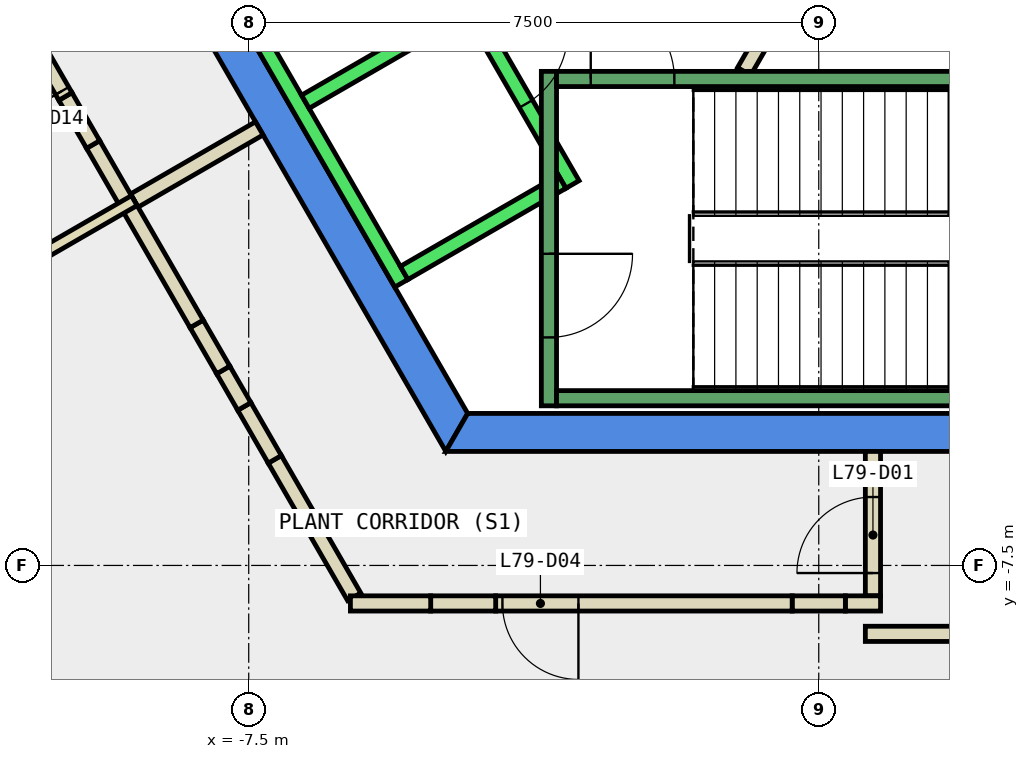
"""IFC4 building model, lengths in metres.
Left out: names, types, materials, properties, quantities, classifications, styles, units other than length and angle.
Written with IfcOpenShell. Run it as: python <this file> out.ifc"""

import sys

from ifc_helpers import new_model, si_unit, direction, frame, frame_2d, origin, place, context, subcontext, project, spatial, polyline, rectangle, outline, extrude, element, fill, save


model = new_model("IFC4")
c1 = context("Model", 3, precision=1e-05, world=origin(), true_north=direction((0.0, 1.0)))
c2 = subcontext(c1, "Body", "Model", "MODEL_VIEW")
j1 = project(units=[si_unit("LENGTHUNIT", "METRE"), si_unit("PLANEANGLEUNIT", "RADIAN")], contexts=[c1])
p1 = place(None, origin())
s1 = spatial("IfcSite", under=j1, at=p1, CompositionType="ELEMENT")
p2 = place(p1, origin())
s2 = spatial("IfcBuilding", under=s1, at=p2, CompositionType="ELEMENT")
p3 = place(p2, frame((0.0, 0.0, 335.9)))
s3 = spatial("IfcBuildingStorey", under=s2, at=p3, CompositionType="ELEMENT", Elevation=335.9)
p4 = place(p3, frame((0.0, 0.0, -0.35)))
e1 = element("IfcWall", 1, at=p4, inside=s3, PredefinedType="SHEAR", context=c2, shape_type="SweptSolid", body=[
    extrude(outline(polyline([(-9.815, 2.5), (-4.907, -6.0), (-4.619, -5.5), (-9.238, 2.5), (-9.815, 2.5)])), origin(), (0.0, 0.0, 1.0), 4.4),
])
p5 = place(p3, frame((0.0, 0.0, -0.35)))
e2 = element("IfcWall", 2, at=p5, inside=s3, PredefinedType="SHEAR", context=c2, shape_type="SweptSolid", body=[
    extrude(outline(polyline([(3.75, -6.0), (3.75, -5.5), (-4.619, -5.5), (-4.907, -6.0), (3.75, -6.0)])), origin(), (0.0, 0.0, 1.0), 4.4),
])
p6 = place(p3, frame((-0.982, -1.0, 0.0), z_axis=(0.0, 0.0, 1.0), x_axis=(0.50024047865, 0.865886518847, 0.0)))
e3 = element("IfcWall", 3, at=p6, inside=s3, PredefinedType="PARTITIONING", context=c2, shape_type="SweptSolid", body=[
    extrude(rectangle(XDim=1.863, YDim=0.2, at=frame_2d((0.931, 0.0))), origin(), (0.0, 0.0, 1.0), 4.05),
])
p7 = place(p3, frame((0.713, -7.9, 0.0), z_axis=(0.0, 0.0, 1.0), x_axis=(0.0, 1.0, 0.0)))
e4 = element("IfcWall", 4, at=p7, inside=s3, PredefinedType="PARTITIONING", context=c2, shape_type="SweptSolid", body=[
    extrude(rectangle(XDim=1.9, YDim=0.2, at=frame_2d((0.95, 0.0))), origin(), (0.0, 0.0, 1.0), 4.05),
])
p8 = place(p7, frame((0.3, 0.0, 0.0)))
e5 = element("IfcOpeningElement", 5, at=p8, cuts=e4, PredefinedType="OPENING", context=c2, shape_type="SweptSolid", body=[
    extrude(rectangle(XDim=1.0, YDim=2.1, at=frame_2d((0.5, 1.05))), frame((0.0, 0.11, 0.0), z_axis=(0.0, -1.0, 0.0), x_axis=(1.0, 0.0, 0.0)), (0.0, 0.0, 1.0), 0.22),
])
p9 = place(p3, frame((2.042, -8.4, 0.0), z_axis=(0.0, 0.0, 1.0), x_axis=(-1.0, 0.0, 0.0)))
e6 = element("IfcWall", 6, at=p9, inside=s3, PredefinedType="PARTITIONING", context=c2, shape_type="SweptSolid", body=[
    extrude(rectangle(XDim=1.429, YDim=0.2, at=frame_2d((0.714, 0.0))), origin(), (0.0, 0.0, 1.0), 4.05),
])
p10 = place(p3, frame((0.813, -8.0, 0.0), z_axis=(0.0, 0.0, 1.0), x_axis=(-1.0, 0.0, 0.0)))
e7 = element("IfcWall", 7, at=p10, inside=s3, PredefinedType="PARTITIONING", context=c2, shape_type="SweptSolid", body=[
    extrude(rectangle(XDim=0.463, YDim=0.2, at=frame_2d((0.231, 0.0))), origin(), (0.0, 0.0, 1.0), 4.05),
])
p11 = place(p3, frame((-6.112, -7.913, 0.0), z_axis=(0.0, 0.0, 1.0), x_axis=(-0.500160776593, 0.865932559475, 0.0)))
e8 = element("IfcWall", 8, at=p11, inside=s3, PredefinedType="PARTITIONING", context=c2, shape_type="SweptSolid", body=[
    extrude(rectangle(XDim=2.089, YDim=0.2, at=frame_2d((1.044, 0.0))), origin(), (0.0, 0.0, 1.0), 4.05),
])
p12 = place(p3, frame((-9.006, -2.7, 0.0), z_axis=(0.0, 0.0, 1.0), x_axis=(0.865980106173, 0.500078449558, 0.0)))
e9 = element("IfcWall", 9, at=p12, inside=s3, PredefinedType="PARTITIONING", context=c2, shape_type="SweptSolid", body=[
    extrude(rectangle(XDim=1.9, YDim=0.2, at=frame_2d((0.95, 0.0))), origin(), (0.0, 0.0, 1.0), 4.05),
])
p13 = place(p3, frame((-9.105, -2.728, 0.0), z_axis=(0.0, 0.0, 1.0), x_axis=(-0.499849883363, 0.866112056319, 0.0)))
e10 = element("IfcWall", 10, at=p13, inside=s3, PredefinedType="PARTITIONING", context=c2, shape_type="SweptSolid", body=[
    extrude(rectangle(XDim=0.885, YDim=0.2, at=frame_2d((0.442, 0.0))), origin(), (0.0, 0.0, 1.0), 4.05),
])
p14 = place(p3, frame((0.35, -8.0, 0.0), z_axis=(0.0, 0.0, 1.0), x_axis=(-1.0, 0.0, 0.0)))
e11 = element("IfcWall", 11, at=p14, inside=s3, PredefinedType="PARTITIONING", context=c2, shape_type="SweptSolid", body=[
    extrude(rectangle(XDim=0.7, YDim=0.2, at=frame_2d((0.35, 0.0))), origin(), (0.0, 0.0, 1.0), 1.95),
])
p15 = place(p3, frame((-0.35, -8.0, 0.0), z_axis=(0.0, 0.0, 1.0), x_axis=(-1.0, 0.0, 0.0)))
e12 = element("IfcWall", 12, at=p15, inside=s3, PredefinedType="PARTITIONING", context=c2, shape_type="SweptSolid", body=[
    extrude(rectangle(XDim=3.901, YDim=0.2, at=frame_2d((1.95, 0.0))), origin(), (0.0, 0.0, 1.0), 4.05),
])
p16 = place(p15, frame((2.812, 0.0, 0.0)))
e13 = element("IfcOpeningElement", 13, at=p16, cuts=e12, PredefinedType="OPENING", context=c2, shape_type="SweptSolid", body=[
    extrude(rectangle(XDim=1.0, YDim=2.1, at=frame_2d((0.5, 1.05))), frame((0.0, 0.11, 0.0), z_axis=(0.0, -1.0, 0.0), x_axis=(1.0, 0.0, 0.0)), (0.0, 0.0, 1.0), 0.22),
])
p17 = place(p3, frame((-4.251, -8.0, 0.0), z_axis=(0.0, 0.0, 1.0), x_axis=(-1.0, 0.0, 0.0)))
e14 = element("IfcWall", 14, at=p17, inside=s3, PredefinedType="PARTITIONING", context=c2, shape_type="SweptSolid", body=[
    extrude(rectangle(XDim=0.855, YDim=0.2, at=frame_2d((0.427, 0.0))), origin(), (0.0, 0.0, 1.0), 1.95),
])
p18 = place(p3, frame((-5.106, -8.0, 0.0), z_axis=(0.0, 0.0, 1.0), x_axis=(-1.0, 0.0, 0.0)))
e15 = element("IfcWall", 15, at=p18, inside=s3, PredefinedType="PARTITIONING", context=c2, shape_type="SweptSolid", body=[
    extrude(rectangle(XDim=1.056, YDim=0.2, at=frame_2d((0.528, 0.0))), origin(), (0.0, 0.0, 1.0), 4.05),
])
p19 = place(p3, frame((-7.157, -6.104, 0.0), z_axis=(0.0, 0.0, 1.0), x_axis=(-0.49931022413, 0.866423279973, 0.0)))
e16 = element("IfcWall", 16, at=p19, inside=s3, PredefinedType="PARTITIONING", context=c2, shape_type="SweptSolid", body=[
    extrude(rectangle(XDim=0.803, YDim=0.2, at=frame_2d((0.402, 0.0))), origin(), (0.0, 0.0, 1.0), 1.95),
])
p20 = place(p3, frame((-7.558, -5.408, 0.0), z_axis=(0.0, 0.0, 1.0), x_axis=(-0.499646164767, 0.866229594296, 0.0)))
e17 = element("IfcWall", 17, at=p20, inside=s3, PredefinedType="PARTITIONING", context=c2, shape_type="SweptSolid", body=[
    extrude(rectangle(XDim=0.554, YDim=0.2, at=frame_2d((0.277, 0.0))), origin(), (0.0, 0.0, 1.0), 4.05),
])
p21 = place(p3, frame((-7.835, -4.928, 0.0), z_axis=(0.0, 0.0, 1.0), x_axis=(-0.500265973451, 0.865871789474, 0.0)))
e18 = element("IfcWall", 18, at=p21, inside=s3, PredefinedType="PARTITIONING", context=c2, shape_type="SweptSolid", body=[
    extrude(rectangle(XDim=0.7, YDim=0.2, at=frame_2d((0.35, 0.0))), origin(), (0.0, 0.0, 1.0), 1.95),
])
p22 = place(p3, frame((-8.185, -4.322, 0.0), z_axis=(0.0, 0.0, 1.0), x_axis=(-0.499848773445, 0.866112696874, 0.0)))
e19 = element("IfcWall", 19, at=p22, inside=s3, PredefinedType="PARTITIONING", context=c2, shape_type="SweptSolid", body=[
    extrude(rectangle(XDim=1.84, YDim=0.2, at=frame_2d((0.92, 0.0))), origin(), (0.0, 0.0, 1.0), 4.05),
])
p23 = place(p3, frame((-20.401, -9.28, 0.0), z_axis=(0.0, 0.0, 1.0), x_axis=(0.865982571061, 0.500074181116, 0.0)))
e20 = element("IfcWall", 20, at=p23, inside=s3, PredefinedType="PARTITIONING", context=c2, shape_type="SweptSolid", body=[
    extrude(rectangle(XDim=13.158, YDim=0.15, at=frame_2d((6.579, 0.0))), origin(), (0.0, 0.0, 1.0), 4.05),
])
p24 = place(p3, frame((-9.547, -1.962, 0.0), z_axis=(0.0, 0.0, 1.0), x_axis=(-0.500205129465, 0.865906939836, 0.0)))
e21 = element("IfcWall", 21, at=p24, inside=s3, PredefinedType="PARTITIONING", context=c2, shape_type="SweptSolid", body=[
    extrude(rectangle(XDim=0.73, YDim=0.2, at=frame_2d((0.365, 0.0))), origin(), (0.0, 0.0, 1.0), 1.95),
])
p25 = place(p3, frame((-9.912, -1.33, 0.0), z_axis=(0.0, 0.0, 1.0), x_axis=(-0.500512107711, 0.865729536307, 0.0)))
e22 = element("IfcWall", 22, at=p25, inside=s3, PredefinedType="PARTITIONING", context=c2, shape_type="SweptSolid", body=[
    extrude(rectangle(XDim=1.249, YDim=0.2, at=frame_2d((0.625, 0.0))), origin(), (0.0, 0.0, 1.0), 4.05),
])
p26 = place(p25, frame((0.085, 0.0, 0.0)))
e23 = element("IfcOpeningElement", 23, at=p26, cuts=e22, PredefinedType="OPENING", context=c2, shape_type="SweptSolid", body=[
    extrude(rectangle(XDim=1.0, YDim=2.1, at=frame_2d((0.5, 1.05))), frame((0.0, 0.11, 0.0), z_axis=(0.0, -1.0, 0.0), x_axis=(1.0, 0.0, 0.0)), (0.0, 0.0, 1.0), 0.22),
])
p27 = place(p3, frame((-5.94, 2.188, 0.0), z_axis=(0.0, 0.0, 1.0), x_axis=(0.500034260056, -0.866005622828, 0.0)))
e24 = element("IfcWall", 24, at=p27, inside=s3, PredefinedType="STANDARD", context=c2, shape_type="SweptSolid", body=[
    extrude(rectangle(XDim=5.399, YDim=0.2, at=frame_2d((2.7, 0.0))), origin(), (0.0, 0.0, 1.0), 4.05),
])
p28 = place(p27, frame((3.075, 0.0, 0.0)))
e25 = element("IfcOpeningElement", 25, at=p28, cuts=e24, PredefinedType="OPENING", context=c2, shape_type="SweptSolid", body=[
    extrude(rectangle(XDim=1.1, YDim=2.1, at=frame_2d((0.55, 1.05))), frame((0.0, 0.11, 0.0), z_axis=(0.0, -1.0, 0.0), x_axis=(1.0, 0.0, 0.0)), (0.0, 0.0, 1.0), 0.22),
])
p29 = place(p27, frame((1.225, 0.0, 0.0)))
e26 = element("IfcOpeningElement", 26, at=p29, cuts=e24, PredefinedType="OPENING", context=c2, shape_type="SweptSolid", body=[
    extrude(rectangle(XDim=1.1, YDim=2.1, at=frame_2d((0.55, 1.05))), frame((0.0, 0.11, 0.0), z_axis=(0.0, -1.0, 0.0), x_axis=(1.0, 0.0, 0.0)), (0.0, 0.0, 1.0), 0.22),
])
p30 = place(p3, frame((-8.192, 0.888, 0.0), z_axis=(0.0, 0.0, 1.0), x_axis=(0.500034260056, -0.866005622828, 0.0)))
e27 = element("IfcWall", 27, at=p30, inside=s3, PredefinedType="STANDARD", context=c2, shape_type="SweptSolid", body=[
    extrude(rectangle(XDim=5.399, YDim=0.2, at=frame_2d((2.7, 0.0))), origin(), (0.0, 0.0, 1.0), 4.05),
])
p31 = place(p3, frame((-4.677, -0.2, 0.0), z_axis=(0.0, 0.0, 1.0), x_axis=(-0.865973769406, -0.500089422704, 0.0)))
e28 = element("IfcWall", 28, at=p31, inside=s3, PredefinedType="STANDARD", context=c2, shape_type="SweptSolid", body=[
    extrude(rectangle(XDim=2.399, YDim=0.2, at=frame_2d((1.2, 0.0))), origin(), (0.0, 0.0, 1.0), 4.05),
])
p32 = place(p3, frame((-3.377, -2.452, 0.0), z_axis=(0.0, 0.0, 1.0), x_axis=(-0.865955154139, -0.50012165622, 0.0)))
e29 = element("IfcWall", 29, at=p32, inside=s3, PredefinedType="STANDARD", context=c2, shape_type="SweptSolid", body=[
    extrude(rectangle(XDim=2.4, YDim=0.2, at=frame_2d((1.2, 0.0))), origin(), (0.0, 0.0, 1.0), 4.05),
])
p33 = place(p3, frame((-3.55, -1.0, 0.0), z_axis=(0.0, 0.0, 1.0), x_axis=(0.0, -1.0, 0.0)))
e30 = element("IfcWall", 30, at=p33, inside=s3, PredefinedType="STANDARD", context=c2, shape_type="SweptSolid", body=[
    extrude(rectangle(XDim=4.4, YDim=0.2, at=frame_2d((2.2, 0.0))), origin(), (0.0, 0.0, 1.0), 4.05),
])
p34 = place(p33, frame((2.4, 0.0, 0.0)))
e31 = element("IfcOpeningElement", 31, at=p34, cuts=e30, PredefinedType="OPENING", context=c2, shape_type="SweptSolid", body=[
    extrude(rectangle(XDim=1.1, YDim=2.2, at=frame_2d((0.55, 1.1))), frame((0.0, 0.11, 0.0), z_axis=(0.0, -1.0, 0.0), x_axis=(1.0, 0.0, 0.0)), (0.0, 0.0, 1.0), 0.22),
])
p35 = place(p3, frame((-3.45, -1.1, 0.0), z_axis=(0.0, 0.0, 1.0), x_axis=(1.0, 0.0, 0.0)))
e32 = element("IfcWall", 32, at=p35, inside=s3, PredefinedType="STANDARD", context=c2, shape_type="SweptSolid", body=[
    extrude(rectangle(XDim=6.9, YDim=0.2, at=frame_2d((3.45, 0.0))), origin(), (0.0, 0.0, 1.0), 4.05),
])
p36 = place(p35, frame((0.45, 0.0, 0.0)))
e33 = element("IfcOpeningElement", 33, at=p36, cuts=e32, PredefinedType="OPENING", context=c2, shape_type="SweptSolid", body=[
    extrude(rectangle(XDim=1.1, YDim=2.2, at=frame_2d((0.55, 1.1))), frame((0.0, 0.11, 0.0), z_axis=(0.0, -1.0, 0.0), x_axis=(1.0, 0.0, 0.0)), (0.0, 0.0, 1.0), 0.22),
])
p37 = place(p3, frame((-3.45, -5.3, 0.0), z_axis=(0.0, 0.0, 1.0), x_axis=(1.0, 0.0, 0.0)))
e34 = element("IfcWall", 34, at=p37, inside=s3, PredefinedType="STANDARD", context=c2, shape_type="SweptSolid", body=[
    extrude(rectangle(XDim=6.9, YDim=0.2, at=frame_2d((3.45, 0.0))), origin(), (0.0, 0.0, 1.0), 4.05),
])
p38 = place(p8, origin())
e35 = element("IfcDoor", 35, at=p38, inside=s3, OperationType="SINGLE_SWING_LEFT", PredefinedType="DOOR", context=c2, shape_type="SweptSolid", body=[
    extrude(rectangle(XDim=1.0, YDim=2.1, at=frame_2d((0.5, 1.05))), frame((0.0, 0.025, 0.0), z_axis=(0.0, -1.0, 0.0), x_axis=(1.0, 0.0, 0.0)), (0.0, 0.0, 1.0), 0.05),
])
fill(e5, e35)
p39 = place(p16, origin())
e36 = element("IfcDoor", 36, at=p39, inside=s3, OperationType="SINGLE_SWING_RIGHT", PredefinedType="DOOR", context=c2, shape_type="SweptSolid", body=[
    extrude(rectangle(XDim=1.0, YDim=2.1, at=frame_2d((0.5, 1.05))), frame((0.0, 0.025, 0.0), z_axis=(0.0, -1.0, 0.0), x_axis=(1.0, 0.0, 0.0)), (0.0, 0.0, 1.0), 0.05),
])
fill(e13, e36)
p40 = place(p26, origin())
e37 = element("IfcDoor", 37, at=p40, inside=s3, OperationType="SINGLE_SWING_LEFT", PredefinedType="DOOR", context=c2, shape_type="SweptSolid", body=[
    extrude(rectangle(XDim=1.0, YDim=2.1, at=frame_2d((0.5, 1.05))), frame((0.0, 0.025, 0.0), z_axis=(0.0, -1.0, 0.0), x_axis=(1.0, 0.0, 0.0)), (0.0, 0.0, 1.0), 0.05),
])
fill(e23, e37)
p41 = place(p28, origin())
e38 = element("IfcDoor", 38, at=p41, inside=s3, OperationType="SLIDING_TO_LEFT", PredefinedType="DOOR", context=c2, shape_type="SweptSolid", body=[
    extrude(rectangle(XDim=1.1, YDim=2.1, at=frame_2d((0.55, 1.05))), frame((0.0, 0.025, 0.0), z_axis=(0.0, -1.0, 0.0), x_axis=(1.0, 0.0, 0.0)), (0.0, 0.0, 1.0), 0.05),
])
fill(e25, e38)
p42 = place(p36, origin())
e39 = element("IfcDoor", 39, at=p42, inside=s3, OperationType="SINGLE_SWING_LEFT", PredefinedType="DOOR", context=c2, shape_type="SweptSolid", body=[
    extrude(rectangle(XDim=1.1, YDim=2.2, at=frame_2d((0.55, 1.1))), frame((0.0, 0.025, 0.0), z_axis=(0.0, -1.0, 0.0), x_axis=(1.0, 0.0, 0.0)), (0.0, 0.0, 1.0), 0.05),
])
fill(e33, e39)
p43 = place(p34, origin())
e40 = element("IfcDoor", 40, at=p43, inside=s3, OperationType="SINGLE_SWING_LEFT", PredefinedType="DOOR", context=c2, shape_type="SweptSolid", body=[
    extrude(rectangle(XDim=1.1, YDim=2.2, at=frame_2d((0.55, 1.1))), frame((0.0, 0.025, 0.0), z_axis=(0.0, -1.0, 0.0), x_axis=(1.0, 0.0, 0.0)), (0.0, 0.0, 1.0), 0.05),
])
fill(e31, e40)
save(model, sys.argv[1])
